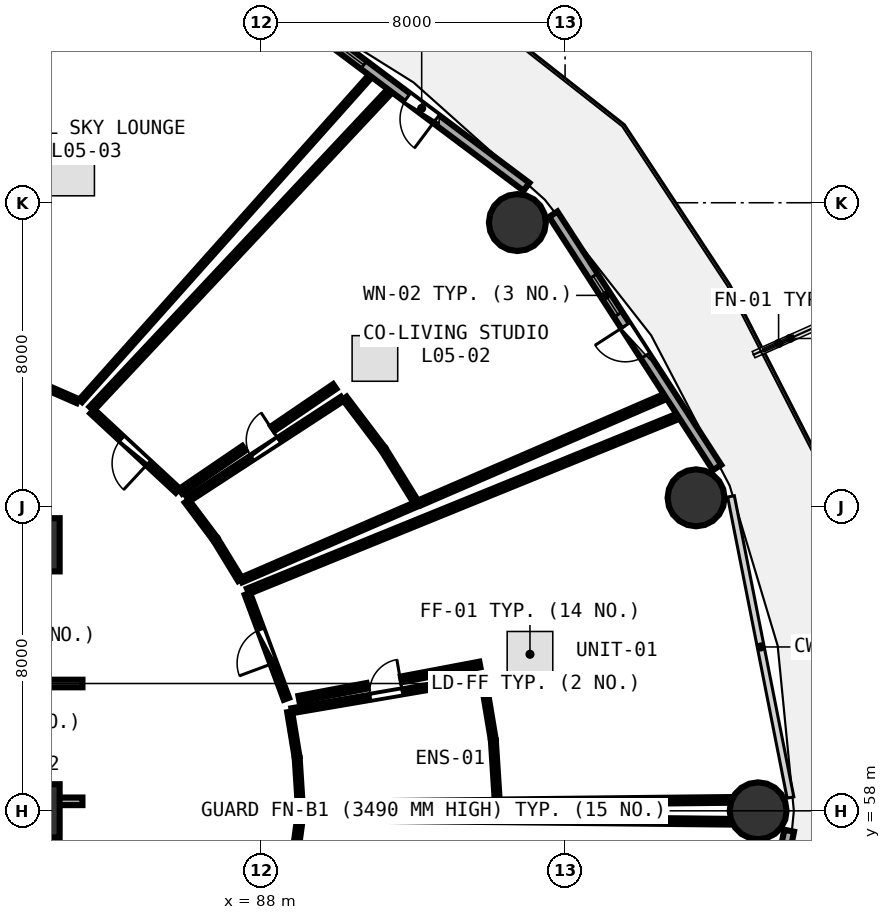
"""IFC4 building model, lengths in metres.
Left out: names, types, materials, properties, quantities, classifications, styles, units other than length and angle.
Written with IfcOpenShell. Run it as: python <this file> out.ifc"""

import sys

from ifc_helpers import new_model, si_unit, direction, frame, frame_2d, origin, origin_2d, place, context, subcontext, project, spatial, rectangle, circle, extrude, element, fill, save


model = new_model("IFC4")
c1 = context("Model", 3, precision=1e-05, world=origin(), true_north=direction((0.0, 1.0)))
c2 = subcontext(c1, "Body", "Model", "MODEL_VIEW")
j1 = project(units=[si_unit("LENGTHUNIT", "METRE"), si_unit("PLANEANGLEUNIT", "RADIAN")], contexts=[c1])
p1 = place(None, origin())
s1 = spatial("IfcSite", under=j1, at=p1, CompositionType="ELEMENT")
p2 = place(p1, origin())
s2 = spatial("IfcBuilding", under=s1, at=p2, CompositionType="ELEMENT")
p3 = place(p2, frame((0.0, 0.0, 22.5)))
s3 = spatial("IfcBuildingStorey", under=s2, at=p3, CompositionType="ELEMENT", Elevation=22.5)
for number, where, z_axis, x_axis in (
    (1, (82.0, 58.0, 0.0), (0.0, 0.0, 1.0), (1.0, 0.0, 0.0)),
    (2, (82.0, 65.0, 0.0), (0.0, 0.0, 1.0), (1.0, 0.0, 0.0)),
):
    element("IfcColumn", number, at=place(p3, frame(where, z_axis=z_axis, x_axis=x_axis)), inside=s3, PredefinedType="PILASTER", context=c2, shape_type="SweptSolid", body=[
        extrude(rectangle(XDim=1.4, YDim=1.4, at=origin_2d()), origin(), (0.0, 0.0, 1.0), 3.75),
    ])
for number, where, z_axis, x_axis in (
    (3, (101.08, 58.0, 0.0), (0.0, 0.0, 1.0), (1.0, 0.0, 0.0)),
    (4, (99.447, 66.236, 0.0), (0.0, 0.0, 1.0), (1.0, 0.0, 0.0)),
    (5, (94.744, 73.478, 0.0), (0.0, 0.0, 1.0), (1.0, 0.0, 0.0)),
):
    element("IfcColumn", number, at=place(p3, frame(where, z_axis=z_axis, x_axis=x_axis)), inside=s3, PredefinedType="COLUMN", context=c2, shape_type="SweptSolid", body=[
        extrude(circle(Radius=0.75, at=origin_2d()), origin(), (0.0, 0.0, 1.0), 3.75),
    ])
p4 = place(p3, frame((99.999, 67.033, 0.0), z_axis=(0.0, 0.0, 1.0), x_axis=(-0.543005114258, 0.839729388488, 0.0)))
e6 = element("IfcWall", 6, at=p4, inside=s3, PredefinedType="SOLIDWALL", context=c2, shape_type="SweptSolid", body=[
    extrude(rectangle(XDim=7.938, YDim=0.26, at=frame_2d((3.969, 0.0))), origin(), (0.0, 0.0, 1.0), 3.475),
])
p5 = place(p4, frame((3.494, 0.0, 0.0)))
e7 = element("IfcOpeningElement", 7, at=p5, cuts=e6, PredefinedType="OPENING", context=c2, shape_type="SweptSolid", body=[
    extrude(rectangle(XDim=0.95, YDim=2.1, at=frame_2d((0.475, 1.05))), frame((0.0, 0.14, 0.0), z_axis=(0.0, -1.0, 0.0), x_axis=(1.0, 0.0, 0.0)), (0.0, 0.0, 1.0), 0.28),
])
p6 = place(p4, frame((4.794, 0.0, 0.85)))
e8 = element("IfcOpeningElement", 8, at=p6, cuts=e6, PredefinedType="OPENING", context=c2, shape_type="SweptSolid", body=[
    extrude(rectangle(XDim=1.2, YDim=1.45, at=frame_2d((0.6, 0.725))), frame((0.0, 0.14, 0.0), z_axis=(0.0, -1.0, 0.0), x_axis=(1.0, 0.0, 0.0)), (0.0, 0.0, 1.0), 0.28),
])
p7 = place(p3, frame((94.984, 74.418, 0.0), z_axis=(0.0, 0.0, 1.0), x_axis=(-0.80030733173, 0.599590005569, 0.0)))
e9 = element("IfcWall", 9, at=p7, inside=s3, PredefinedType="SOLIDWALL", context=c2, shape_type="SweptSolid", body=[
    extrude(rectangle(XDim=8.291, YDim=0.26, at=frame_2d((4.145, 0.0))), origin(), (0.0, 0.0, 1.0), 3.475),
])
p8 = place(p7, frame((2.97, 0.0, 0.0)))
e10 = element("IfcOpeningElement", 10, at=p8, cuts=e9, PredefinedType="OPENING", context=c2, shape_type="SweptSolid", body=[
    extrude(rectangle(XDim=0.95, YDim=2.1, at=frame_2d((0.475, 1.05))), frame((0.0, 0.14, 0.0), z_axis=(0.0, -1.0, 0.0), x_axis=(1.0, 0.0, 0.0)), (0.0, 0.0, 1.0), 0.28),
])
p9 = place(p7, frame((5.35, 0.0, 0.85)))
e11 = element("IfcOpeningElement", 11, at=p9, cuts=e9, PredefinedType="OPENING", context=c2, shape_type="SweptSolid", body=[
    extrude(rectangle(XDim=1.2, YDim=1.45, at=frame_2d((0.6, 0.725))), frame((0.0, 0.14, 0.0), z_axis=(0.0, -1.0, 0.0), x_axis=(1.0, 0.0, 0.0)), (0.0, 0.0, 1.0), 0.28),
])
p10 = place(p3, frame((100.404, 49.92, 0.0), z_axis=(0.0, 0.0, 1.0), x_axis=(0.193726159581, 0.98105564322, 0.0)))
e12 = element("IfcWall", 12, at=p10, inside=s3, PredefinedType="SOLIDWALL", context=c2, shape_type="SweptSolid", body=[
    extrude(rectangle(XDim=7.703, YDim=0.26, at=frame_2d((3.851, 0.0))), origin(), (0.0, 0.0, 1.0), 3.475),
])
p11 = place(p10, frame((3.051, 0.0, 0.85)))
e13 = element("IfcOpeningElement", 13, at=p11, cuts=e12, PredefinedType="OPENING", context=c2, shape_type="SweptSolid", body=[
    extrude(rectangle(XDim=1.6, YDim=1.45, at=frame_2d((0.8, 0.725))), frame((0.0, 0.14, 0.0), z_axis=(0.0, -1.0, 0.0), x_axis=(1.0, 0.0, 0.0)), (0.0, 0.0, 1.0), 0.28),
])
p12 = place(p3, frame((79.3, 61.35, 0.0), z_axis=(0.0, 0.0, 1.0), x_axis=(1.0, 0.0, 0.0)))
e14 = element("IfcWall", 14, at=p12, inside=s3, PredefinedType="SOLIDWALL", context=c2, shape_type="SweptSolid", body=[
    extrude(rectangle(XDim=4.0, YDim=0.2, at=frame_2d((2.0, 0.0))), origin(), (0.0, 0.0, 1.0), 2.775),
])
p13 = place(p12, frame((0.45, 0.0, 0.0)))
e15 = element("IfcOpeningElement", 15, at=p13, cuts=e14, PredefinedType="OPENING", context=c2, shape_type="SweptSolid", body=[
    extrude(rectangle(XDim=1.2, YDim=2.15, at=frame_2d((0.6, 1.075))), frame((0.0, 0.11, 0.0), z_axis=(0.0, -1.0, 0.0), x_axis=(1.0, 0.0, 0.0)), (0.0, 0.0, 1.0), 0.22),
])
p14 = place(p3, frame((79.3, 58.25, 0.0), z_axis=(0.0, 0.0, 1.0), x_axis=(1.0, 0.0, 0.0)))
e16 = element("IfcWall", 16, at=p14, inside=s3, PredefinedType="SOLIDWALL", context=c2, shape_type="SweptSolid", body=[
    extrude(rectangle(XDim=4.0, YDim=0.2, at=frame_2d((2.0, 0.0))), origin(), (0.0, 0.0, 1.0), 2.775),
])
p15 = place(p14, frame((0.5, 0.0, 0.0)))
e17 = element("IfcOpeningElement", 17, at=p15, cuts=e16, PredefinedType="OPENING", context=c2, shape_type="SweptSolid", body=[
    extrude(rectangle(XDim=1.1, YDim=2.1, at=frame_2d((0.55, 1.05))), frame((0.0, 0.11, 0.0), z_axis=(0.0, -1.0, 0.0), x_axis=(1.0, 0.0, 0.0)), (0.0, 0.0, 1.0), 0.22),
])
p16 = place(p3, frame((88.808, 60.634, 0.0), z_axis=(0.0, 0.0, 1.0), x_axis=(0.985746995542, 0.168234540986, 0.0)))
e18 = element("IfcWall", 18, at=p16, inside=s3, PredefinedType="PLUMBINGWALL", context=c2, shape_type="SweptSolid", body=[
    extrude(rectangle(XDim=5.046, YDim=0.13, at=frame_2d((2.523, 0.0))), origin(), (0.0, 0.0, 1.0), 3.175),
])
p17 = place(p16, frame((2.093, 0.0, 0.0)))
e19 = element("IfcOpeningElement", 19, at=p17, cuts=e18, PredefinedType="OPENING", context=c2, shape_type="SweptSolid", body=[
    extrude(rectangle(XDim=0.86, YDim=2.05, at=frame_2d((0.43, 1.025))), frame((0.0, 0.075, 0.0), z_axis=(0.0, -1.0, 0.0), x_axis=(1.0, 0.0, 0.0)), (0.0, 0.0, 1.0), 0.15),
])
p18 = place(p3, frame((88.667, 60.948, 0.0), z_axis=(0.0, 0.0, 1.0), x_axis=(-0.348640514247, 0.937256524024, 0.0)))
e20 = element("IfcWall", 20, at=p18, inside=s3, PredefinedType="PARTITIONING", context=c2, shape_type="SweptSolid", body=[
    extrude(rectangle(XDim=2.943, YDim=0.15, at=frame_2d((1.472, 0.0))), origin(), (0.0, 0.0, 1.0), 3.48),
])
p19 = place(p18, frame((0.997, 0.0, 0.0)))
e21 = element("IfcOpeningElement", 21, at=p19, cuts=e20, PredefinedType="OPENING", context=c2, shape_type="SweptSolid", body=[
    extrude(rectangle(XDim=0.95, YDim=2.08, at=frame_2d((0.475, 1.04))), frame((0.0, 0.085, 0.0), z_axis=(0.0, -1.0, 0.0), x_axis=(1.0, 0.0, 0.0)), (0.0, 0.0, 1.0), 0.17),
])
p20 = place(p3, frame((86.083, 66.2, 0.0), z_axis=(0.0, 0.0, 1.0), x_axis=(0.837796261941, 0.545982988267, 0.0)))
e22 = element("IfcWall", 22, at=p20, inside=s3, PredefinedType="PLUMBINGWALL", context=c2, shape_type="SweptSolid", body=[
    extrude(rectangle(XDim=4.838, YDim=0.13, at=frame_2d((2.419, 0.0))), origin(), (0.0, 0.0, 1.0), 3.235),
])
p21 = place(p20, frame((1.989, 0.0, 0.0)))
e23 = element("IfcOpeningElement", 23, at=p21, cuts=e22, PredefinedType="OPENING", context=c2, shape_type="SweptSolid", body=[
    extrude(rectangle(XDim=0.86, YDim=2.05, at=frame_2d((0.43, 1.025))), frame((0.0, 0.075, 0.0), z_axis=(0.0, -1.0, 0.0), x_axis=(1.0, 0.0, 0.0)), (0.0, 0.0, 1.0), 0.15),
])
p22 = place(p3, frame((85.806, 66.425, 0.0), z_axis=(0.0, 0.0, 1.0), x_axis=(-0.7329267348, 0.680307578538, 0.0)))
e24 = element("IfcWall", 24, at=p22, inside=s3, PredefinedType="PARTITIONING", context=c2, shape_type="SweptSolid", body=[
    extrude(rectangle(XDim=3.067, YDim=0.15, at=frame_2d((1.533, 0.0))), origin(), (0.0, 0.0, 1.0), 2.875),
])
p23 = place(p22, frame((1.059, 0.0, 0.0)))
e25 = element("IfcOpeningElement", 25, at=p23, cuts=e24, PredefinedType="OPENING", context=c2, shape_type="SweptSolid", body=[
    extrude(rectangle(XDim=0.95, YDim=2.08, at=frame_2d((0.475, 1.04))), frame((0.0, 0.085, 0.0), z_axis=(0.0, -1.0, 0.0), x_axis=(1.0, 0.0, 0.0)), (0.0, 0.0, 1.0), 0.17),
])
p24 = place(p3, frame((83.172, 68.783, 0.0), z_axis=(0.0, 0.0, 1.0), x_axis=(-0.916419655578, 0.400218708797, 0.0)))
e26 = element("IfcWall", 26, at=p24, inside=s3, PredefinedType="PARTITIONING", context=c2, shape_type="SweptSolid", body=[
    extrude(rectangle(XDim=6.104, YDim=0.12, at=frame_2d((3.052, 0.0))), origin(), (0.0, 0.0, 1.0), 2.875),
])
p25 = place(p24, frame((2.602, 0.0, 0.0)))
e27 = element("IfcOpeningElement", 27, at=p25, cuts=e26, PredefinedType="OPENING", context=c2, shape_type="SweptSolid", body=[
    extrude(rectangle(XDim=0.9, YDim=2.08, at=frame_2d((0.45, 1.04))), frame((0.0, 0.07, 0.0), z_axis=(0.0, -1.0, 0.0), x_axis=(1.0, 0.0, 0.0)), (0.0, 0.0, 1.0), 0.14),
])
p26 = place(p3, frame((88.625, 54.885, 0.0), z_axis=(0.0, 0.0, 1.0), x_axis=(0.135838186105, 0.990731036758, 0.0)))
e28 = element("IfcWall", 28, at=p26, inside=s3, PredefinedType="PARTITIONING", context=c2, shape_type="SweptSolid", body=[
    extrude(rectangle(XDim=2.915, YDim=0.15, at=frame_2d((1.458, 0.0))), origin(), (0.0, 0.0, 1.0), 3.48),
])
p27 = place(p26, frame((0.983, 0.0, 0.0)))
e29 = element("IfcOpeningElement", 29, at=p27, cuts=e28, PredefinedType="OPENING", context=c2, shape_type="SweptSolid", body=[
    extrude(rectangle(XDim=0.95, YDim=2.08, at=frame_2d((0.475, 1.04))), frame((0.0, 0.085, 0.0), z_axis=(0.0, -1.0, 0.0), x_axis=(1.0, 0.0, 0.0)), (0.0, 0.0, 1.0), 0.17),
])
p28 = place(p3, frame((89.028, 58.187, 0.0), z_axis=(0.0, 0.0, 1.0), x_axis=(-0.063661240763, 0.99797156594, 0.0)))
e30 = element("IfcWall", 30, at=p28, inside=s3, PredefinedType="PLUMBINGWALL", context=c2, shape_type="SweptSolid", body=[
    extrude(rectangle(XDim=1.197, YDim=0.13, at=frame_2d((0.598, 0.0))), origin(), (0.0, 0.0, 1.0), 2.875),
])
p29 = place(p3, frame((88.947, 59.421, 0.0), z_axis=(0.0, 0.0, 1.0), x_axis=(-0.162220174474, 0.986754587014, 0.0)))
e31 = element("IfcWall", 31, at=p29, inside=s3, PredefinedType="PLUMBINGWALL", context=c2, shape_type="SweptSolid", body=[
    extrude(rectangle(XDim=1.199, YDim=0.13, at=frame_2d((0.6, 0.0))), origin(), (0.0, 0.0, 1.0), 3.48),
])
p30 = place(p3, frame((93.844, 61.473, 0.0), z_axis=(0.0, 0.0, 1.0), x_axis=(0.16417773594, -0.986430773558, 0.0)))
e32 = element("IfcWall", 32, at=p30, inside=s3, PredefinedType="PLUMBINGWALL", context=c2, shape_type="SweptSolid", body=[
    extrude(rectangle(XDim=1.611, YDim=0.13, at=frame_2d((0.805, 0.0))), origin(), (0.0, 0.0, 1.0), 3.48),
])
p31 = place(p3, frame((94.113, 59.845, 0.0), z_axis=(0.0, 0.0, 1.0), x_axis=(0.06383542257, -0.997960439509, 0.0)))
e33 = element("IfcWall", 33, at=p31, inside=s3, PredefinedType="PLUMBINGWALL", context=c2, shape_type="SweptSolid", body=[
    extrude(rectangle(XDim=1.606, YDim=0.13, at=frame_2d((0.803, 0.0))), origin(), (0.0, 0.0, 1.0), 3.48),
])
p32 = place(p3, frame((94.197, 58.222, 0.0), z_axis=(0.0, 0.0, 1.0), x_axis=(-0.999944081579, -0.010575146078, 0.0)))
e34 = element("IfcWall", 34, at=p32, inside=s3, PredefinedType="PLUMBINGWALL", context=c2, shape_type="SweptSolid", body=[
    extrude(rectangle(XDim=5.148, YDim=0.13, at=frame_2d((2.574, 0.0))), origin(), (0.0, 0.0, 1.0), 2.875),
])
p33 = place(p3, frame((87.657, 63.778, 0.0), z_axis=(0.0, 0.0, 1.0), x_axis=(0.926333713065, 0.376703931542, 0.0)))
e35 = element("IfcWall", 35, at=p33, inside=s3, PredefinedType="PARTITIONING", context=c2, shape_type="SweptSolid", body=[
    extrude(rectangle(XDim=12.099, YDim=0.15, at=frame_2d((6.05, 0.0))), origin(), (0.0, 0.0, 1.0), 2.875),
])
p34 = place(p3, frame((100.36, 58.287, 0.0), z_axis=(0.0, 0.0, 1.0), x_axis=(-0.999943071294, -0.010670246996, 0.0)))
e36 = element("IfcWall", 36, at=p34, inside=s3, PredefinedType="PARTITIONING", context=c2, shape_type="SweptSolid", body=[
    extrude(rectangle(XDim=6.063, YDim=0.15, at=frame_2d((3.032, 0.0))), origin(), (0.0, 0.0, 1.0), 3.235),
])
p35 = place(p3, frame((93.759, 61.851, 0.0), z_axis=(0.0, 0.0, 1.0), x_axis=(-0.98260291219, -0.185718919219, 0.0)))
e37 = element("IfcWall", 37, at=p35, inside=s3, PredefinedType="PARTITIONING", context=c2, shape_type="SweptSolid", body=[
    extrude(rectangle(XDim=2.102, YDim=0.15, at=frame_2d((1.051, 0.0))), origin(), (0.0, 0.0, 1.0), 3.175),
])
p36 = place(p3, frame((90.789, 61.289, 0.0), z_axis=(0.0, 0.0, 1.0), x_axis=(-0.98259072308, -0.185783397852, 0.0)))
e38 = element("IfcWall", 38, at=p36, inside=s3, PredefinedType="PARTITIONING", context=c2, shape_type="SweptSolid", body=[
    extrude(rectangle(XDim=1.824, YDim=0.15, at=frame_2d((0.912, 0.0))), origin(), (0.0, 0.0, 1.0), 3.235),
])
p37 = place(p3, frame((87.451, 64.08, 0.0), z_axis=(0.0, 0.0, 1.0), x_axis=(-0.52146609248, 0.853272004928, 0.0)))
e39 = element("IfcWall", 39, at=p37, inside=s3, PredefinedType="PLUMBINGWALL", context=c2, shape_type="SweptSolid", body=[
    extrude(rectangle(XDim=1.228, YDim=0.13, at=frame_2d((0.614, 0.0))), origin(), (0.0, 0.0, 1.0), 3.48),
])
p38 = place(p3, frame((86.788, 65.161, 0.0), z_axis=(0.0, 0.0, 1.0), x_axis=(-0.600347056143, 0.79973959023, 0.0)))
e40 = element("IfcWall", 40, at=p38, inside=s3, PredefinedType="PLUMBINGWALL", context=c2, shape_type="SweptSolid", body=[
    extrude(rectangle(XDim=1.238, YDim=0.13, at=frame_2d((0.619, 0.0))), origin(), (0.0, 0.0, 1.0), 2.875),
])
p39 = place(p3, frame((90.199, 68.858, 0.0), z_axis=(0.0, 0.0, 1.0), x_axis=(0.60376191721, -0.797164692725, 0.0)))
e41 = element("IfcWall", 41, at=p39, inside=s3, PredefinedType="PLUMBINGWALL", context=c2, shape_type="SweptSolid", body=[
    extrude(rectangle(XDim=1.669, YDim=0.13, at=frame_2d((0.834, 0.0))), origin(), (0.0, 0.0, 1.0), 3.175),
])
p40 = place(p3, frame((91.229, 67.495, 0.0), z_axis=(0.0, 0.0, 1.0), x_axis=(0.525540089642, -0.850768837099, 0.0)))
e42 = element("IfcWall", 42, at=p40, inside=s3, PredefinedType="PLUMBINGWALL", context=c2, shape_type="SweptSolid", body=[
    extrude(rectangle(XDim=1.651, YDim=0.13, at=frame_2d((0.826, 0.0))), origin(), (0.0, 0.0, 1.0), 3.175),
])
p41 = place(p3, frame((92.09, 66.065, 0.0), z_axis=(0.0, 0.0, 1.0), x_axis=(-0.917797204715, -0.397049481826, 0.0)))
e43 = element("IfcWall", 43, at=p41, inside=s3, PredefinedType="PLUMBINGWALL", context=c2, shape_type="SweptSolid", body=[
    extrude(rectangle(XDim=5.023, YDim=0.13, at=frame_2d((2.511, 0.0))), origin(), (0.0, 0.0, 1.0), 2.875),
])
p42 = place(p3, frame((83.542, 68.581, 0.0), z_axis=(0.0, 0.0, 1.0), x_axis=(0.684261294523, 0.729236916796, 0.0)))
e44 = element("IfcWall", 44, at=p42, inside=s3, PredefinedType="PARTITIONING", context=c2, shape_type="SweptSolid", body=[
    extrude(rectangle(XDim=11.438, YDim=0.15, at=frame_2d((5.719, 0.0))), origin(), (0.0, 0.0, 1.0), 2.875),
])
p43 = place(p3, frame((98.574, 68.874, 0.0), z_axis=(0.0, 0.0, 1.0), x_axis=(-0.917736225937, -0.397190407239, 0.0)))
e45 = element("IfcWall", 45, at=p43, inside=s3, PredefinedType="PARTITIONING", context=c2, shape_type="SweptSolid", body=[
    extrude(rectangle(XDim=6.967, YDim=0.15, at=frame_2d((3.483, 0.0))), origin(), (0.0, 0.0, 1.0), 2.875),
])
p44 = place(p3, frame((89.939, 69.166, 0.0), z_axis=(0.0, 0.0, 1.0), x_axis=(-0.826811291248, -0.562479411769, 0.0)))
e46 = element("IfcWall", 46, at=p44, inside=s3, PredefinedType="PARTITIONING", context=c2, shape_type="SweptSolid", body=[
    extrude(rectangle(XDim=1.971, YDim=0.15, at=frame_2d((0.985, 0.0))), origin(), (0.0, 0.0, 1.0), 3.48),
])
p45 = place(p3, frame((87.549, 67.539, 0.0), z_axis=(0.0, 0.0, 1.0), x_axis=(-0.826867883695, -0.562396215237, 0.0)))
e47 = element("IfcWall", 47, at=p45, inside=s3, PredefinedType="PARTITIONING", context=c2, shape_type="SweptSolid", body=[
    extrude(rectangle(XDim=2.014, YDim=0.15, at=frame_2d((1.007, 0.0))), origin(), (0.0, 0.0, 1.0), 3.235),
])
p46 = place(p3, frame((90.844, 77.294, 0.0), z_axis=(0.0, 0.0, 1.0), x_axis=(-0.66580890104, -0.746122313897, 0.0)))
e48 = element("IfcWall", 48, at=p46, inside=s3, PredefinedType="PARTITIONING", context=c2, shape_type="SweptSolid", body=[
    extrude(rectangle(XDim=11.399, YDim=0.1, at=frame_2d((5.7, 0.0))), origin(), (0.0, 0.0, 1.0), 2.875),
])
p47 = place(p3, frame((89.069, 57.833, 0.0), z_axis=(0.0, 0.0, 1.0), x_axis=(0.999943877154, -0.010594458135, 0.0)))
e49 = element("IfcWall", 49, at=p47, inside=s3, PredefinedType="PARTITIONING", context=c2, shape_type="SweptSolid", body=[
    extrude(rectangle(XDim=11.292, YDim=0.15, at=frame_2d((5.646, 0.0))), origin(), (0.0, 0.0, 1.0), 2.875),
])
p48 = place(p5, frame((0.95, 0.0, 0.0), z_axis=(0.0, 0.0, 1.0), x_axis=(-1.0, 0.0, 0.0)))
e50 = element("IfcDoor", 50, at=p48, inside=s3, OperationType="SINGLE_SWING_LEFT", PredefinedType="DOOR", context=c2, shape_type="SweptSolid", body=[
    extrude(rectangle(XDim=0.95, YDim=2.1, at=frame_2d((0.475, 1.05))), frame((0.0, 0.025, 0.0), z_axis=(0.0, -1.0, 0.0), x_axis=(1.0, 0.0, 0.0)), (0.0, 0.0, 1.0), 0.05),
])
fill(e7, e50)
p49 = place(p6, origin())
e51 = element("IfcWindow", 51, at=p49, inside=s3, PartitioningType="SINGLE_PANEL", PredefinedType="WINDOW", context=c2, shape_type="SweptSolid", body=[
    extrude(rectangle(XDim=1.2, YDim=1.45, at=frame_2d((0.6, 0.725))), frame((0.0, 0.03, 0.0), z_axis=(0.0, -1.0, 0.0), x_axis=(1.0, 0.0, 0.0)), (0.0, 0.0, 1.0), 0.06),
])
fill(e8, e51)
p50 = place(p8, frame((0.95, 0.0, 0.0), z_axis=(0.0, 0.0, 1.0), x_axis=(-1.0, 0.0, 0.0)))
e52 = element("IfcDoor", 52, at=p50, inside=s3, OperationType="SINGLE_SWING_RIGHT", PredefinedType="DOOR", context=c2, shape_type="SweptSolid", body=[
    extrude(rectangle(XDim=0.95, YDim=2.1, at=frame_2d((0.475, 1.05))), frame((0.0, 0.025, 0.0), z_axis=(0.0, -1.0, 0.0), x_axis=(1.0, 0.0, 0.0)), (0.0, 0.0, 1.0), 0.05),
])
fill(e10, e52)
p51 = place(p9, origin())
e53 = element("IfcWindow", 53, at=p51, inside=s3, PartitioningType="SINGLE_PANEL", PredefinedType="WINDOW", context=c2, shape_type="SweptSolid", body=[
    extrude(rectangle(XDim=1.2, YDim=1.45, at=frame_2d((0.6, 0.725))), frame((0.0, 0.03, 0.0), z_axis=(0.0, -1.0, 0.0), x_axis=(1.0, 0.0, 0.0)), (0.0, 0.0, 1.0), 0.06),
])
fill(e11, e53)
p52 = place(p17, origin())
e54 = element("IfcDoor", 54, at=p52, inside=s3, OperationType="SINGLE_SWING_RIGHT", PredefinedType="DOOR", context=c2, shape_type="SweptSolid", body=[
    extrude(rectangle(XDim=0.86, YDim=2.05, at=frame_2d((0.43, 1.025))), frame((0.0, 0.025, 0.0), z_axis=(0.0, -1.0, 0.0), x_axis=(1.0, 0.0, 0.0)), (0.0, 0.0, 1.0), 0.05),
])
fill(e19, e54)
p53 = place(p19, origin())
e55 = element("IfcDoor", 55, at=p53, inside=s3, OperationType="SINGLE_SWING_LEFT", PredefinedType="DOOR", context=c2, shape_type="SweptSolid", body=[
    extrude(rectangle(XDim=0.95, YDim=2.08, at=frame_2d((0.475, 1.04))), frame((0.0, 0.025, 0.0), z_axis=(0.0, -1.0, 0.0), x_axis=(1.0, 0.0, 0.0)), (0.0, 0.0, 1.0), 0.05),
])
fill(e21, e55)
p54 = place(p21, origin())
e56 = element("IfcDoor", 56, at=p54, inside=s3, OperationType="SINGLE_SWING_RIGHT", PredefinedType="DOOR", context=c2, shape_type="SweptSolid", body=[
    extrude(rectangle(XDim=0.86, YDim=2.05, at=frame_2d((0.43, 1.025))), frame((0.0, 0.025, 0.0), z_axis=(0.0, -1.0, 0.0), x_axis=(1.0, 0.0, 0.0)), (0.0, 0.0, 1.0), 0.05),
])
fill(e23, e56)
p55 = place(p23, origin())
e57 = element("IfcDoor", 57, at=p55, inside=s3, OperationType="SINGLE_SWING_LEFT", PredefinedType="DOOR", context=c2, shape_type="SweptSolid", body=[
    extrude(rectangle(XDim=0.95, YDim=2.08, at=frame_2d((0.475, 1.04))), frame((0.0, 0.025, 0.0), z_axis=(0.0, -1.0, 0.0), x_axis=(1.0, 0.0, 0.0)), (0.0, 0.0, 1.0), 0.05),
])
fill(e25, e57)
save(model, sys.argv[1])
